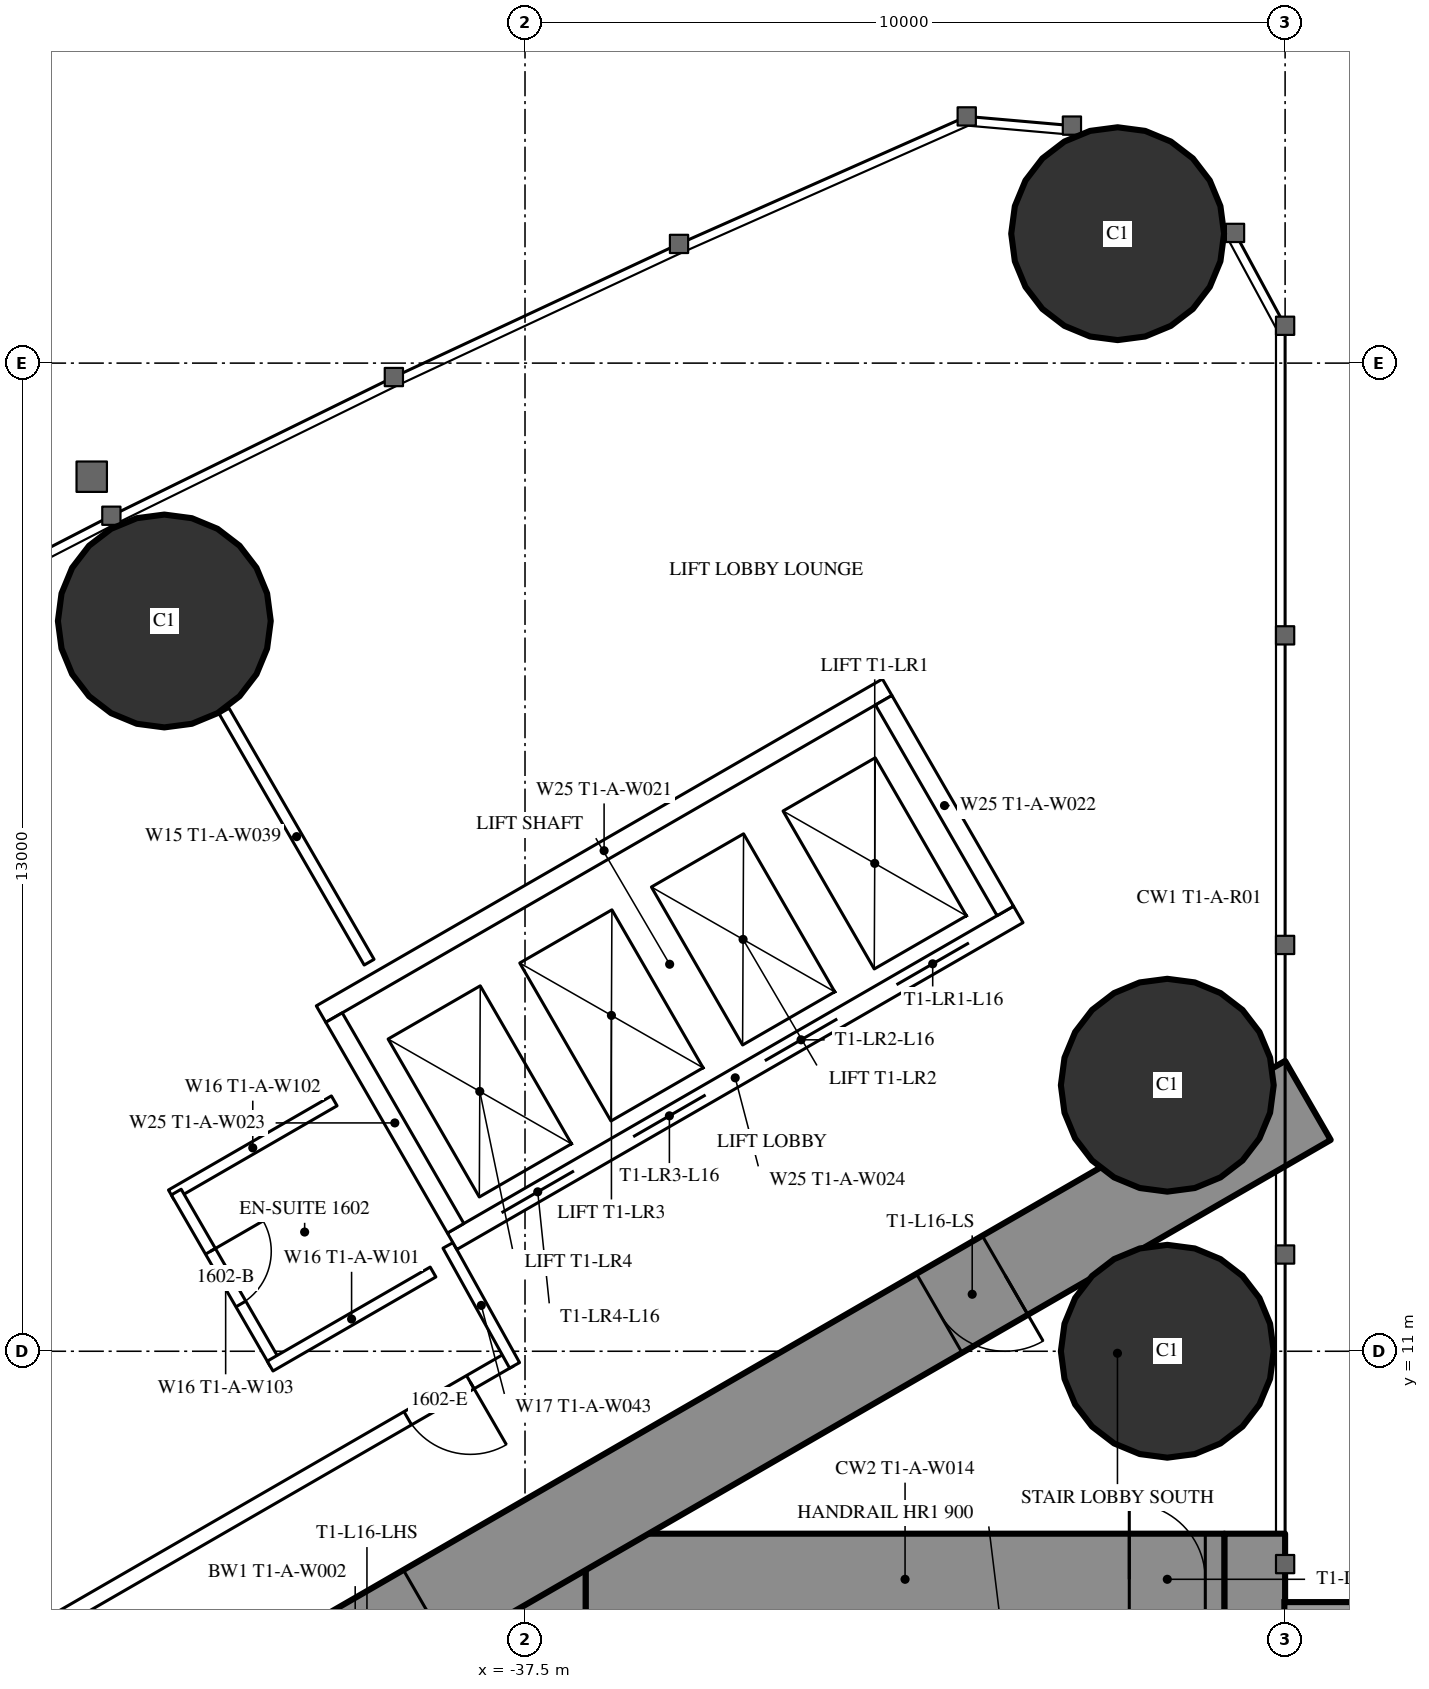
"""IFC4 building model, lengths in metres.
Left out: names, types, materials, properties, quantities, classifications, styles, units other than length and angle.
Written with IfcOpenShell. Run it as: python <this file> out.ifc"""

import sys

from ifc_helpers import new_model, si_unit, direction, frame, frame_2d, origin, origin_2d, place, context, subcontext, project, spatial, rectangle, hollow_circle, extrude, element, fill, save


model = new_model("IFC4")
c1 = context("Model", 3, precision=1e-05, world=origin(), true_north=direction((0.0, 1.0)))
c2 = subcontext(c1, "Body", "Model", "MODEL_VIEW")
j1 = project(units=[si_unit("LENGTHUNIT", "METRE"), si_unit("PLANEANGLEUNIT", "RADIAN")], contexts=[c1])
p1 = place(None, origin())
s1 = spatial("IfcSite", under=j1, at=p1, CompositionType="ELEMENT")
p2 = place(p1, origin())
s2 = spatial("IfcBuilding", under=s1, at=p2, CompositionType="ELEMENT")
p3 = place(p2, frame((0.0, 0.0, 63.5)))
s3 = spatial("IfcBuildingStorey", under=s2, at=p3, CompositionType="ELEMENT", Elevation=63.5)
for number, where, z_axis, x_axis in (
    (1, (-29.703, 25.703, 0.0), (0.0, 0.0, 1.0), (1.0, 0.0, 0.0)),
    (2, (-29.05, 11.0, 0.0), (0.0, 0.0, 1.0), (1.0, 0.0, 0.0)),
    (3, (-29.05, 14.5, 0.0), (0.0, 0.0, 1.0), (1.0, 0.0, 0.0)),
    (4, (-42.245, 20.607, 0.0), (0.0, 0.0, 1.0), (1.0, 0.0, 0.0)),
):
    element("IfcColumn", number, at=place(p3, frame(where, z_axis=z_axis, x_axis=x_axis)), inside=s3, PredefinedType="COLUMN", context=c2, shape_type="SweptSolid", body=[
        extrude(hollow_circle(Radius=1.4, WallThickness=0.12, at=origin_2d()), origin(), (0.0, 0.0, 1.0), 3.5),
    ])
p4 = place(p3, frame((-27.9, 8.6, 0.0), z_axis=(0.0, 0.0, 1.0), x_axis=(0.0, -1.0, 0.0)))
e5 = element("IfcWall", 5, at=p4, inside=s3, PredefinedType="SHEAR", context=c2, shape_type="SweptSolid", body=[
    extrude(rectangle(XDim=17.2, YDim=0.8, at=frame_2d((8.6, 0.0))), origin(), (0.0, 0.0, 1.0), 3.5),
])
p5 = place(p4, frame((2.45, 0.0, 0.6)))
e6 = element("IfcOpeningElement", 6, at=p5, cuts=e5, PredefinedType="OPENING", context=c2, shape_type="SweptSolid", body=[
    extrude(rectangle(XDim=0.6, YDim=2.1, at=frame_2d((0.3, 1.05))), frame((0.0, 0.41, 0.0), z_axis=(0.0, -1.0, 0.0), x_axis=(1.0, 0.0, 0.0)), (0.0, 0.0, 1.0), 0.82),
])
p6 = place(p4, frame((14.15, 0.0, 0.6)))
e7 = element("IfcOpeningElement", 7, at=p6, cuts=e5, PredefinedType="OPENING", context=c2, shape_type="SweptSolid", body=[
    extrude(rectangle(XDim=0.6, YDim=2.1, at=frame_2d((0.3, 1.05))), frame((0.0, 0.41, 0.0), z_axis=(0.0, -1.0, 0.0), x_axis=(1.0, 0.0, 0.0)), (0.0, 0.0, 1.0), 0.82),
])
p7 = place(p3, frame((-37.3, 8.6, 0.0), z_axis=(0.0, 0.0, 1.0), x_axis=(0.0, -1.0, 0.0)))
e8 = element("IfcWall", 8, at=p7, inside=s3, PredefinedType="SHEAR", context=c2, shape_type="SweptSolid", body=[
    extrude(rectangle(XDim=17.2, YDim=1.2, at=frame_2d((8.6, 0.0))), origin(), (0.0, 0.0, 1.0), 3.5),
])
p8 = place(p7, frame((7.7, 0.0, 0.0)))
e9 = element("IfcOpeningElement", 9, at=p8, cuts=e8, PredefinedType="OPENING", context=c2, shape_type="SweptSolid", body=[
    extrude(rectangle(XDim=1.8, YDim=2.2, at=frame_2d((0.9, 1.1))), frame((0.0, 0.61, 0.0), z_axis=(0.0, -1.0, 0.0), x_axis=(1.0, 0.0, 0.0)), (0.0, 0.0, 1.0), 1.22),
])
p9 = place(p3, frame((-28.3, 8.0, 0.0), z_axis=(0.0, 0.0, 1.0), x_axis=(-1.0, 0.0, 0.0)))
e10 = element("IfcWall", 10, at=p9, inside=s3, PredefinedType="SHEAR", context=c2, shape_type="SweptSolid", body=[
    extrude(rectangle(XDim=8.4, YDim=1.2, at=frame_2d((4.2, 0.0))), origin(), (0.0, 0.0, 1.0), 3.5),
])
p10 = place(p9, frame((0.25, 0.0, 0.0)))
e11 = element("IfcOpeningElement", 11, at=p10, cuts=e10, PredefinedType="OPENING", context=c2, shape_type="SweptSolid", body=[
    extrude(rectangle(XDim=1.0, YDim=2.2, at=frame_2d((0.5, 1.1))), frame((0.0, 0.61, 0.0), z_axis=(0.0, -1.0, 0.0), x_axis=(1.0, 0.0, 0.0)), (0.0, 0.0, 1.0), 1.22),
])
p11 = place(p3, frame((-27.2, 14.3, 0.0), z_axis=(0.0, 0.0, 1.0), x_axis=(-0.866026593062, -0.499997940104, 0.0)))
e12 = element("IfcWall", 12, at=p11, inside=s3, PredefinedType="SHEAR", context=c2, shape_type="SweptSolid", body=[
    extrude(rectangle(XDim=28.946, YDim=1.2, at=frame_2d((14.473, 0.0))), origin(), (0.0, 0.0, 1.0), 3.5),
])
p12 = place(p11, frame((4.6, 0.0, 0.0)))
e13 = element("IfcOpeningElement", 13, at=p12, cuts=e12, PredefinedType="OPENING", context=c2, shape_type="SweptSolid", body=[
    extrude(rectangle(XDim=1.0, YDim=2.2, at=frame_2d((0.5, 1.1))), frame((0.0, 0.61, 0.0), z_axis=(0.0, -1.0, 0.0), x_axis=(1.0, 0.0, 0.0)), (0.0, 0.0, 1.0), 1.22),
])
p13 = place(p11, frame((13.395, 0.0, 0.0)))
e14 = element("IfcOpeningElement", 14, at=p13, cuts=e12, PredefinedType="OPENING", context=c2, shape_type="SweptSolid", body=[
    extrude(rectangle(XDim=1.8, YDim=2.2, at=frame_2d((0.9, 1.1))), frame((0.0, 0.61, 0.0), z_axis=(0.0, -1.0, 0.0), x_axis=(1.0, 0.0, 0.0)), (0.0, 0.0, 1.0), 1.22),
])
p14 = place(p3, frame((-39.551, 16.119, 0.0), z_axis=(0.0, 0.0, 1.0), x_axis=(-0.500014214979, 0.866017196607, 0.0)))
e15 = element("IfcWall", 15, at=p14, inside=s3, PredefinedType="PARTITIONING", context=c2, shape_type="SweptSolid", body=[
    extrude(rectangle(XDim=3.815, YDim=0.15, at=frame_2d((1.907, 0.0))), origin(), (0.0, 0.0, 1.0), 3.25),
])
p15 = place(p3, frame((-37.7, 10.894, 0.0), z_axis=(0.0, 0.0, 1.0), x_axis=(-0.866027905338, -0.499995667157, 0.0)))
e16 = element("IfcWall", 16, at=p15, inside=s3, PredefinedType="PARTITIONING", context=c2, shape_type="SweptSolid", body=[
    extrude(rectangle(XDim=21.787, YDim=0.2, at=frame_2d((10.894, 0.0))), origin(), (0.0, 0.0, 1.0), 3.25),
])
p16 = place(p15, frame((14.13, 0.0, 0.0)))
e17 = element("IfcOpeningElement", 17, at=p16, cuts=e16, PredefinedType="OPENING", context=c2, shape_type="SweptSolid", body=[
    extrude(rectangle(XDim=0.95, YDim=2.2, at=frame_2d((0.475, 1.1))), frame((0.0, 0.11, 0.0), z_axis=(0.0, -1.0, 0.0), x_axis=(1.0, 0.0, 0.0)), (0.0, 0.0, 1.0), 0.22),
])
p17 = place(p15, frame((20.058, 0.0, 0.0)))
e18 = element("IfcOpeningElement", 18, at=p17, cuts=e16, PredefinedType="OPENING", context=c2, shape_type="SweptSolid", body=[
    extrude(rectangle(XDim=0.95, YDim=2.2, at=frame_2d((0.475, 1.1))), frame((0.0, 0.11, 0.0), z_axis=(0.0, -1.0, 0.0), x_axis=(1.0, 0.0, 0.0)), (0.0, 0.0, 1.0), 0.22),
])
p18 = place(p15, frame((0.6, 0.0, 0.0)))
e19 = element("IfcOpeningElement", 19, at=p18, cuts=e16, PredefinedType="OPENING", context=c2, shape_type="SweptSolid", body=[
    extrude(rectangle(XDim=0.95, YDim=2.2, at=frame_2d((0.475, 1.1))), frame((0.0, 0.11, 0.0), z_axis=(0.0, -1.0, 0.0), x_axis=(1.0, 0.0, 0.0)), (0.0, 0.0, 1.0), 0.22),
])
p19 = place(p3, frame((-38.513, 12.392, 0.0), z_axis=(0.0, 0.0, 1.0), x_axis=(0.485585508183, -0.874189175317, 0.0)))
e20 = element("IfcWall", 20, at=p19, inside=s3, PredefinedType="PARTITIONING", context=c2, shape_type="SweptSolid", body=[
    extrude(rectangle(XDim=1.805, YDim=0.15, at=frame_2d((0.902, 0.0))), origin(), (0.0, 0.0, 1.0), 3.25),
])
p20 = place(p3, frame((-40.01, 14.294, 0.0), z_axis=(0.0, 0.0, 1.0), x_axis=(-0.866031185235, -0.4999899861, 0.0)))
e21 = element("IfcWall", 21, at=p20, inside=s3, PredefinedType="PARTITIONING", context=c2, shape_type="SweptSolid", body=[
    extrude(rectangle(XDim=2.475, YDim=0.15, at=frame_2d((1.238, 0.0))), origin(), (0.0, 0.0, 1.0), 3.25),
])
p21 = place(p3, frame((-40.788, 10.843, 0.0), z_axis=(0.0, 0.0, 1.0), x_axis=(-0.500006934395, 0.866021400173, 0.0)))
e22 = element("IfcWall", 22, at=p21, inside=s3, PredefinedType="PARTITIONING", context=c2, shape_type="SweptSolid", body=[
    extrude(rectangle(XDim=2.6, YDim=0.15, at=frame_2d((1.3, 0.0))), origin(), (0.0, 0.0, 1.0), 3.25),
])
p22 = place(p21, frame((0.9, 0.0, 0.0)))
e23 = element("IfcOpeningElement", 23, at=p22, cuts=e22, PredefinedType="OPENING", context=c2, shape_type="SweptSolid", body=[
    extrude(rectangle(XDim=0.8, YDim=2.2, at=frame_2d((0.4, 1.1))), frame((0.0, 0.085, 0.0), z_axis=(0.0, -1.0, 0.0), x_axis=(1.0, 0.0, 0.0)), (0.0, 0.0, 1.0), 0.17),
])
p23 = place(p3, frame((-38.71, 12.042, 0.0), z_axis=(0.0, 0.0, 1.0), x_axis=(-0.86604923931, -0.499958713387, 0.0)))
e24 = element("IfcWall", 24, at=p23, inside=s3, PredefinedType="PARTITIONING", context=c2, shape_type="SweptSolid", body=[
    extrude(rectangle(XDim=2.475, YDim=0.15, at=frame_2d((1.237, 0.0))), origin(), (0.0, 0.0, 1.0), 3.25),
])
p24 = place(p3, frame((-31.01, 16.747, 0.0), z_axis=(0.0, 0.0, 1.0), x_axis=(-0.866028165386, -0.499995216735, 0.0)))
e25 = element("IfcWall", 25, at=p24, inside=s3, PredefinedType="PARTITIONING", context=c2, shape_type="SweptSolid", body=[
    extrude(rectangle(XDim=8.6, YDim=0.25, at=frame_2d((4.3, 0.0))), origin(), (0.0, 0.0, 1.0), 3.25),
])
p25 = place(p24, frame((0.75, 0.0, 0.0)))
e26 = element("IfcOpeningElement", 26, at=p25, cuts=e25, PredefinedType="OPENING", context=c2, shape_type="SweptSolid", body=[
    extrude(rectangle(XDim=1.1, YDim=2.2, at=frame_2d((0.55, 1.1))), frame((0.0, 0.135, 0.0), z_axis=(0.0, -1.0, 0.0), x_axis=(1.0, 0.0, 0.0)), (0.0, 0.0, 1.0), 0.27),
])
p26 = place(p24, frame((2.75, 0.0, 0.0)))
e27 = element("IfcOpeningElement", 27, at=p26, cuts=e25, PredefinedType="OPENING", context=c2, shape_type="SweptSolid", body=[
    extrude(rectangle(XDim=1.1, YDim=2.2, at=frame_2d((0.55, 1.1))), frame((0.0, 0.135, 0.0), z_axis=(0.0, -1.0, 0.0), x_axis=(1.0, 0.0, 0.0)), (0.0, 0.0, 1.0), 0.27),
])
p27 = place(p24, frame((4.75, 0.0, 0.0)))
e28 = element("IfcOpeningElement", 28, at=p27, cuts=e25, PredefinedType="OPENING", context=c2, shape_type="SweptSolid", body=[
    extrude(rectangle(XDim=1.1, YDim=2.2, at=frame_2d((0.55, 1.1))), frame((0.0, 0.135, 0.0), z_axis=(0.0, -1.0, 0.0), x_axis=(1.0, 0.0, 0.0)), (0.0, 0.0, 1.0), 0.27),
])
p28 = place(p24, frame((6.75, 0.0, 0.0)))
e29 = element("IfcOpeningElement", 29, at=p28, cuts=e25, PredefinedType="OPENING", context=c2, shape_type="SweptSolid", body=[
    extrude(rectangle(XDim=1.1, YDim=2.2, at=frame_2d((0.55, 1.1))), frame((0.0, 0.135, 0.0), z_axis=(0.0, -1.0, 0.0), x_axis=(1.0, 0.0, 0.0)), (0.0, 0.0, 1.0), 0.27),
])
p29 = place(p3, frame((-32.736, 19.736, 0.0), z_axis=(0.0, 0.0, 1.0), x_axis=(-0.866028165386, -0.499995216735, 0.0)))
e30 = element("IfcWall", 30, at=p29, inside=s3, PredefinedType="PARTITIONING", context=c2, shape_type="SweptSolid", body=[
    extrude(rectangle(XDim=8.6, YDim=0.25, at=frame_2d((4.3, 0.0))), origin(), (0.0, 0.0, 1.0), 3.25),
])
p30 = place(p3, frame((-31.181, 16.793, 0.0), z_axis=(0.0, 0.0, 1.0), x_axis=(-0.499929347863, 0.866066190972, 0.0)))
e31 = element("IfcWall", 31, at=p30, inside=s3, PredefinedType="PARTITIONING", context=c2, shape_type="SweptSolid", body=[
    extrude(rectangle(XDim=3.201, YDim=0.25, at=frame_2d((1.6, 0.0))), origin(), (0.0, 0.0, 1.0), 3.25),
])
p31 = place(p3, frame((-38.413, 12.618, 0.0), z_axis=(0.0, 0.0, 1.0), x_axis=(-0.499872130319, 0.866099216793, 0.0)))
e32 = element("IfcWall", 32, at=p31, inside=s3, PredefinedType="PARTITIONING", context=c2, shape_type="SweptSolid", body=[
    extrude(rectangle(XDim=3.2, YDim=0.25, at=frame_2d((1.6, 0.0))), origin(), (0.0, 0.0, 1.0), 3.25),
])
p32 = place(p22, origin())
e33 = element("IfcDoor", 33, at=p32, inside=s3, OperationType="SINGLE_SWING_RIGHT", PredefinedType="DOOR", context=c2, shape_type="SweptSolid", body=[
    extrude(rectangle(XDim=0.8, YDim=2.2, at=frame_2d((0.4, 1.1))), frame((0.0, 0.025, 0.0), z_axis=(0.0, -1.0, 0.0), x_axis=(1.0, 0.0, 0.0)), (0.0, 0.0, 1.0), 0.05),
])
fill(e23, e33)
p33 = place(p18, origin())
e34 = element("IfcDoor", 34, at=p33, inside=s3, OperationType="SINGLE_SWING_LEFT", PredefinedType="DOOR", context=c2, shape_type="SweptSolid", body=[
    extrude(rectangle(XDim=0.95, YDim=2.2, at=frame_2d((0.475, 1.1))), frame((0.0, 0.025, 0.0), z_axis=(0.0, -1.0, 0.0), x_axis=(1.0, 0.0, 0.0)), (0.0, 0.0, 1.0), 0.05),
])
fill(e19, e34)
p34 = place(p12, origin())
e35 = element("IfcDoor", 35, at=p34, inside=s3, OperationType="SINGLE_SWING_LEFT", PredefinedType="DOOR", context=c2, shape_type="SweptSolid", body=[
    extrude(rectangle(XDim=1.0, YDim=2.2, at=frame_2d((0.5, 1.1))), frame((0.0, 0.025, 0.0), z_axis=(0.0, -1.0, 0.0), x_axis=(1.0, 0.0, 0.0)), (0.0, 0.0, 1.0), 0.05),
])
fill(e13, e35)
p35 = place(p13, origin())
e36 = element("IfcDoor", 36, at=p35, inside=s3, OperationType="DOUBLE_DOOR_SINGLE_SWING", PredefinedType="DOOR", context=c2, shape_type="SweptSolid", body=[
    extrude(rectangle(XDim=1.8, YDim=2.2, at=frame_2d((0.9, 1.1))), frame((0.0, 0.025, 0.0), z_axis=(0.0, -1.0, 0.0), x_axis=(1.0, 0.0, 0.0)), (0.0, 0.0, 1.0), 0.05),
])
fill(e14, e36)
p36 = place(p10, origin())
e37 = element("IfcDoor", 37, at=p36, inside=s3, OperationType="SINGLE_SWING_RIGHT", PredefinedType="DOOR", context=c2, shape_type="SweptSolid", body=[
    extrude(rectangle(XDim=1.0, YDim=2.2, at=frame_2d((0.5, 1.1))), frame((0.0, 0.025, 0.0), z_axis=(0.0, -1.0, 0.0), x_axis=(1.0, 0.0, 0.0)), (0.0, 0.0, 1.0), 0.05),
])
fill(e11, e37)
p37 = place(p25, origin())
e38 = element("IfcDoor", 38, at=p37, inside=s3, OperationType="DOUBLE_DOOR_SLIDING", PredefinedType="USERDEFINED", context=c2, shape_type="SweptSolid", body=[
    extrude(rectangle(XDim=1.1, YDim=2.2, at=frame_2d((0.55, 1.1))), frame((0.0, 0.025, 0.0), z_axis=(0.0, -1.0, 0.0), x_axis=(1.0, 0.0, 0.0)), (0.0, 0.0, 1.0), 0.05),
])
fill(e26, e38)
p38 = place(p26, origin())
e39 = element("IfcDoor", 39, at=p38, inside=s3, OperationType="DOUBLE_DOOR_SLIDING", PredefinedType="USERDEFINED", context=c2, shape_type="SweptSolid", body=[
    extrude(rectangle(XDim=1.1, YDim=2.2, at=frame_2d((0.55, 1.1))), frame((0.0, 0.025, 0.0), z_axis=(0.0, -1.0, 0.0), x_axis=(1.0, 0.0, 0.0)), (0.0, 0.0, 1.0), 0.05),
])
fill(e27, e39)
p39 = place(p27, origin())
e40 = element("IfcDoor", 40, at=p39, inside=s3, OperationType="DOUBLE_DOOR_SLIDING", PredefinedType="USERDEFINED", context=c2, shape_type="SweptSolid", body=[
    extrude(rectangle(XDim=1.1, YDim=2.2, at=frame_2d((0.55, 1.1))), frame((0.0, 0.025, 0.0), z_axis=(0.0, -1.0, 0.0), x_axis=(1.0, 0.0, 0.0)), (0.0, 0.0, 1.0), 0.05),
])
fill(e28, e40)
p40 = place(p28, origin())
e41 = element("IfcDoor", 41, at=p40, inside=s3, OperationType="DOUBLE_DOOR_SLIDING", PredefinedType="USERDEFINED", context=c2, shape_type="SweptSolid", body=[
    extrude(rectangle(XDim=1.1, YDim=2.2, at=frame_2d((0.55, 1.1))), frame((0.0, 0.025, 0.0), z_axis=(0.0, -1.0, 0.0), x_axis=(1.0, 0.0, 0.0)), (0.0, 0.0, 1.0), 0.05),
])
fill(e29, e41)
save(model, sys.argv[1])
